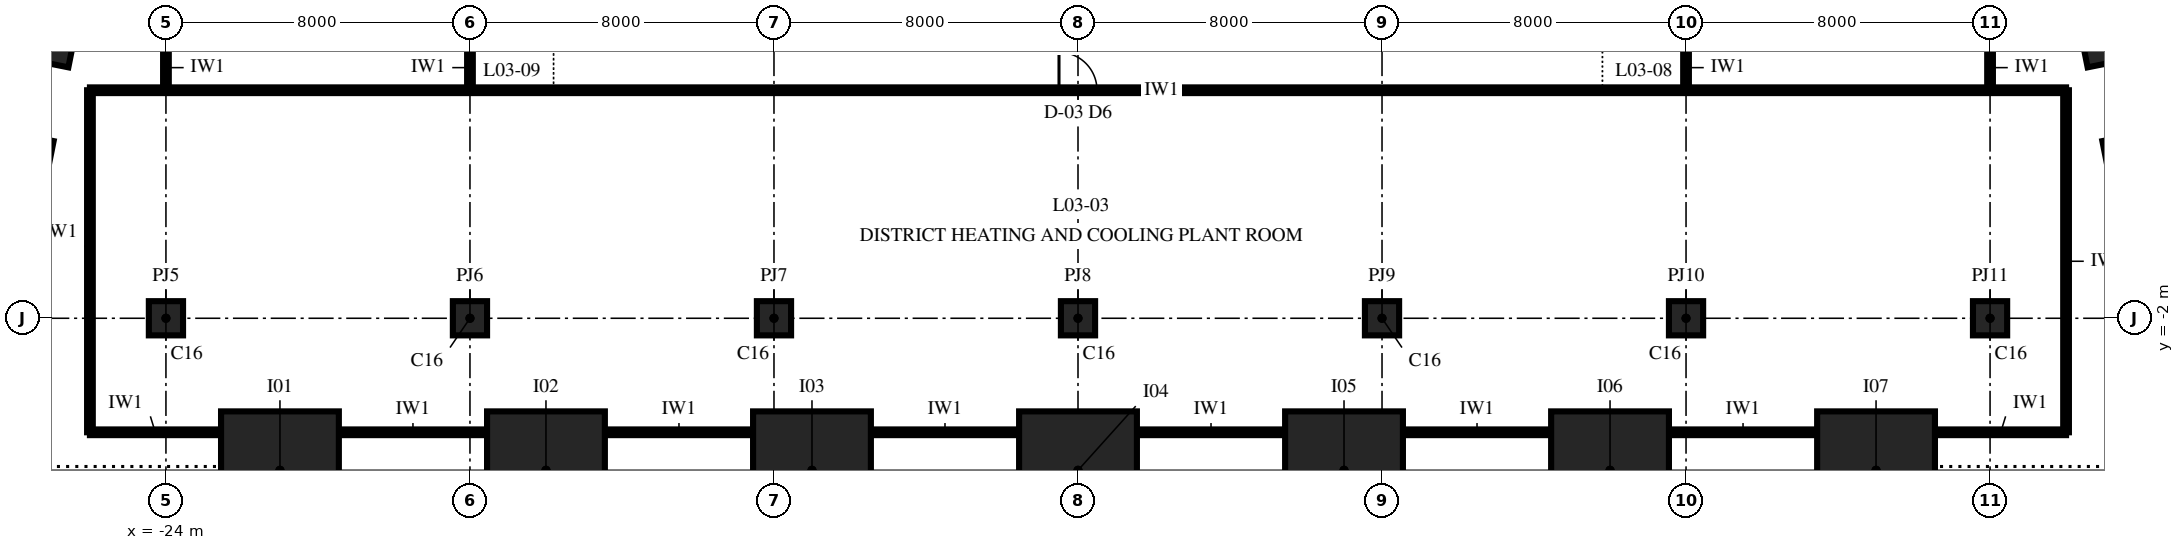
"""IFC4 building model, lengths in metres.
Left out: names, types, materials, properties, quantities, classifications, styles, units other than length and angle.
Written with IfcOpenShell. Run it as: python <this file> out.ifc"""

import sys

from ifc_helpers import new_model, si_unit, direction, frame, frame_2d, origin, origin_2d, place, context, subcontext, project, spatial, rectangle, extrude, element, fill, save


model = new_model("IFC4")
c1 = context("Model", 3, precision=1e-05, world=origin(), true_north=direction((0.0, 1.0)))
c2 = subcontext(c1, "Body", "Model", "MODEL_VIEW")
j1 = project(units=[si_unit("LENGTHUNIT", "METRE"), si_unit("PLANEANGLEUNIT", "RADIAN")], contexts=[c1])
p1 = place(None, origin())
s1 = spatial("IfcSite", under=j1, at=p1, CompositionType="ELEMENT")
p2 = place(p1, origin())
s2 = spatial("IfcBuilding", under=s1, at=p2, CompositionType="ELEMENT")
p3 = place(p2, frame((0.0, 0.0, 19.0)))
s3 = spatial("IfcBuildingStorey", under=s2, at=p3, CompositionType="ELEMENT", Elevation=19.0)
for number, where, z_axis, x_axis in (
    (1, (28.191, 1.838, 0.0), (0.0, 0.0, 1.0), (-0.196, 0.981, 0.0)),
    (2, (27.391, 5.838, 0.0), (0.0, 0.0, 1.0), (-0.196, 0.981, 0.0)),
    (3, (-27.391, 5.838, 0.0), (0.0, 0.0, 1.0), (-0.196, -0.981, 0.0)),
    (4, (-28.191, 1.838, 0.0), (0.0, 0.0, 1.0), (-0.196, -0.981, 0.0)),
):
    element("IfcColumn", number, at=place(p3, frame(where, z_axis=z_axis, x_axis=x_axis)), inside=s3, PredefinedType="COLUMN", context=c2, shape_type="SweptSolid", body=[
        extrude(rectangle(XDim=2.1, YDim=2.1, at=origin_2d()), origin(), (0.0, 0.0, 1.0), 9.0),
    ])
for number, where, z_axis, x_axis in (
    (5, (-21.0, -6.0, 0.0), (0.0, 0.0, 1.0), (1.0, 0.0, 0.0)),
    (6, (-14.0, -6.0, 0.0), (0.0, 0.0, 1.0), (1.0, 0.0, 0.0)),
    (7, (-7.0, -6.0, 0.0), (0.0, 0.0, 1.0), (1.0, 0.0, 0.0)),
    (8, (0.0, -6.0, 0.0), (0.0, 0.0, 1.0), (1.0, 0.0, 0.0)),
    (9, (7.0, -6.0, 0.0), (0.0, 0.0, 1.0), (1.0, 0.0, 0.0)),
    (10, (14.0, -6.0, 0.0), (0.0, 0.0, 1.0), (1.0, 0.0, 0.0)),
    (11, (21.0, -6.0, 0.0), (0.0, 0.0, 1.0), (1.0, 0.0, 0.0)),
):
    element("IfcColumn", number, at=place(p3, frame(where, z_axis=z_axis, x_axis=x_axis)), inside=s3, PredefinedType="COLUMN", context=c2, shape_type="SweptSolid", body=[
        extrude(rectangle(XDim=3.1, YDim=3.1, at=origin_2d()), origin(), (0.0, 0.0, 1.0), 9.0),
    ])
for number, where, z_axis, x_axis in (
    (12, (-24.0, -2.0, 0.0), (0.0, 0.0, 1.0), (1.0, 0.0, 0.0)),
    (13, (-16.0, -2.0, 0.0), (0.0, 0.0, 1.0), (1.0, 0.0, 0.0)),
    (14, (-8.0, -2.0, 0.0), (0.0, 0.0, 1.0), (1.0, 0.0, 0.0)),
    (15, (0.0, -2.0, 0.0), (0.0, 0.0, 1.0), (1.0, 0.0, 0.0)),
    (16, (8.0, -2.0, 0.0), (0.0, 0.0, 1.0), (1.0, 0.0, 0.0)),
    (17, (16.0, -2.0, 0.0), (0.0, 0.0, 1.0), (1.0, 0.0, 0.0)),
    (18, (24.0, -2.0, 0.0), (0.0, 0.0, 1.0), (1.0, 0.0, 0.0)),
):
    element("IfcColumn", number, at=place(p3, frame(where, z_axis=z_axis, x_axis=x_axis)), inside=s3, PredefinedType="COLUMN", context=c2, shape_type="SweptSolid", body=[
        extrude(rectangle(XDim=0.9, YDim=0.9, at=origin_2d()), origin(), (0.0, 0.0, 1.0), 9.0),
    ])
p4 = place(p3, frame((-26.0, -5.0, 0.0), z_axis=(0.0, 0.0, 1.0), x_axis=(0.0, 1.0, 0.0)))
e19 = element("IfcWall", 19, at=p4, inside=s3, PredefinedType="PARTITIONING", context=c2, shape_type="SweptSolid", body=[
    extrude(rectangle(XDim=9.0, YDim=0.15, at=frame_2d((4.5, 0.0))), origin(), (0.0, 0.0, 1.0), 8.13),
])
for number, where, z_axis, x_axis in (
    (20, (-24.0, 4.0, 0.0), (0.0, 0.0, 1.0), (0.0, 1.0, 0.0)),
    (21, (-16.0, 4.0, 0.0), (0.0, 0.0, 1.0), (0.0, 1.0, 0.0)),
    (22, (16.0, 4.0, 0.0), (0.0, 0.0, 1.0), (0.0, 1.0, 0.0)),
    (23, (24.0, 4.0, 0.0), (0.0, 0.0, 1.0), (0.0, 1.0, 0.0)),
):
    element("IfcWall", number, at=place(p3, frame(where, z_axis=z_axis, x_axis=x_axis)), inside=s3, PredefinedType="PARTITIONING", context=c2, shape_type="SweptSolid", body=[
        extrude(rectangle(XDim=1.19, YDim=0.15, at=frame_2d((0.595, 0.0))), origin(), (0.0, 0.0, 1.0), 8.75),
    ])
p5 = place(p3, frame((26.0, -5.0, 0.0), z_axis=(0.0, 0.0, 1.0), x_axis=(0.0, 1.0, 0.0)))
e24 = element("IfcWall", 24, at=p5, inside=s3, PredefinedType="PARTITIONING", context=c2, shape_type="SweptSolid", body=[
    extrude(rectangle(XDim=9.0, YDim=0.15, at=frame_2d((4.5, 0.0))), origin(), (0.0, 0.0, 1.0), 8.13),
])
p6 = place(p3, frame((-26.0, -5.0, 0.0), z_axis=(0.0, 0.0, 1.0), x_axis=(1.0, 0.0, 0.0)))
e25 = element("IfcWall", 25, at=p6, inside=s3, PredefinedType="PARTITIONING", context=c2, shape_type="SweptSolid", body=[
    extrude(rectangle(XDim=3.44, YDim=0.15, at=frame_2d((1.72, 0.0))), origin(), (0.0, 0.0, 1.0), 8.75),
])
for number, where, z_axis, x_axis in (
    (26, (-19.44, -5.0, 0.0), (0.0, 0.0, 1.0), (1.0, 0.0, 0.0)),
    (27, (-12.44, -5.0, 0.0), (0.0, 0.0, 1.0), (1.0, 0.0, 0.0)),
    (28, (-5.44, -5.0, 0.0), (0.0, 0.0, 1.0), (1.0, 0.0, 0.0)),
    (29, (1.56, -5.0, 0.0), (0.0, 0.0, 1.0), (1.0, 0.0, 0.0)),
    (30, (8.56, -5.0, 0.0), (0.0, 0.0, 1.0), (1.0, 0.0, 0.0)),
    (31, (15.56, -5.0, 0.0), (0.0, 0.0, 1.0), (1.0, 0.0, 0.0)),
):
    element("IfcWall", number, at=place(p3, frame(where, z_axis=z_axis, x_axis=x_axis)), inside=s3, PredefinedType="PARTITIONING", context=c2, shape_type="SweptSolid", body=[
        extrude(rectangle(XDim=3.88, YDim=0.15, at=frame_2d((1.94, 0.0))), origin(), (0.0, 0.0, 1.0), 8.75),
    ])
p7 = place(p3, frame((22.56, -5.0, 0.0), z_axis=(0.0, 0.0, 1.0), x_axis=(1.0, 0.0, 0.0)))
e32 = element("IfcWall", 32, at=p7, inside=s3, PredefinedType="PARTITIONING", context=c2, shape_type="SweptSolid", body=[
    extrude(rectangle(XDim=3.44, YDim=0.15, at=frame_2d((1.72, 0.0))), origin(), (0.0, 0.0, 1.0), 8.75),
])
p8 = place(p3, frame((-26.0, 4.0, 0.0), z_axis=(0.0, 0.0, 1.0), x_axis=(1.0, 0.0, 0.0)))
e33 = element("IfcWall", 33, at=p8, inside=s3, PredefinedType="PARTITIONING", context=c2, shape_type="SweptSolid", body=[
    extrude(rectangle(XDim=52.0, YDim=0.15, at=frame_2d((26.0, 0.0))), origin(), (0.0, 0.0, 1.0), 8.75),
])
p9 = place(p8, frame((25.5, 0.0, 0.0)))
e34 = element("IfcOpeningElement", 34, at=p9, cuts=e33, PredefinedType="OPENING", context=c2, shape_type="SweptSolid", body=[
    extrude(rectangle(XDim=1.0, YDim=2.1, at=frame_2d((0.5, 1.05))), frame((0.0, 0.09, 0.0), z_axis=(0.0, -1.0, 0.0), x_axis=(1.0, 0.0, 0.0)), (0.0, 0.0, 1.0), 0.18),
])
p10 = place(p9, origin())
e35 = element("IfcDoor", 35, at=p10, inside=s3, OperationType="SINGLE_SWING_LEFT", PredefinedType="DOOR", context=c2, shape_type="SweptSolid", body=[
    extrude(rectangle(XDim=1.0, YDim=2.1, at=frame_2d((0.5, 1.05))), frame((0.0, 0.075, 0.0), z_axis=(0.0, -1.0, 0.0), x_axis=(1.0, 0.0, 0.0)), (0.0, 0.0, 1.0), 0.149),
])
fill(e34, e35)
save(model, sys.argv[1])
